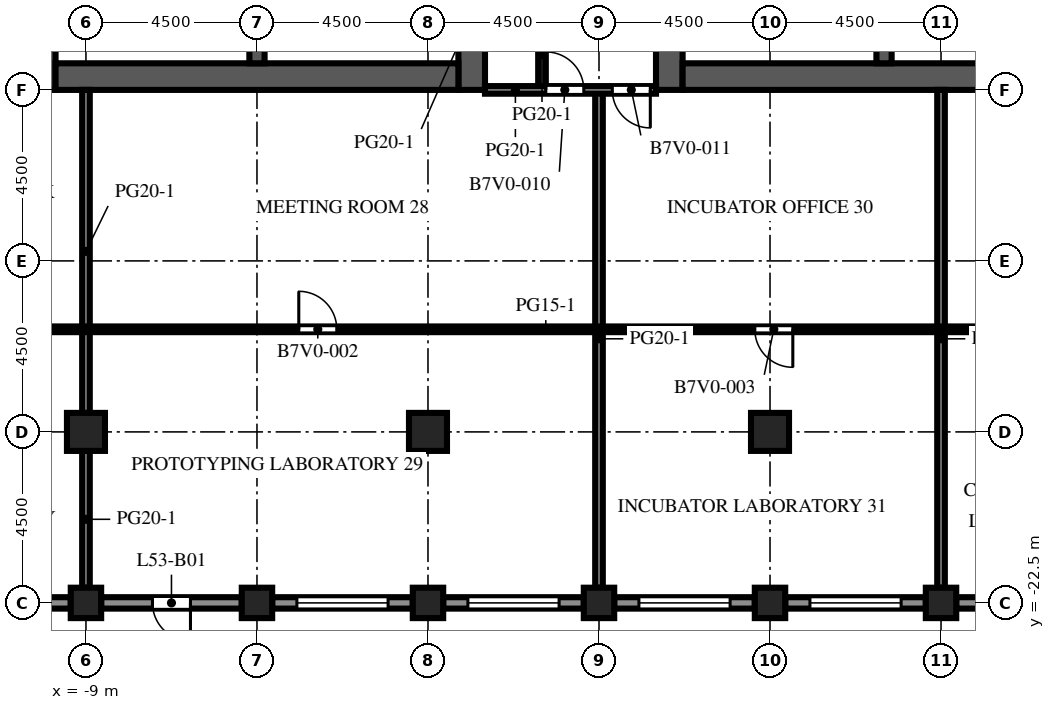
"""IFC4 building model, lengths in metres.
Left out: names, types, materials, properties, quantities, classifications, styles, units other than length and angle.
Written with IfcOpenShell. Run it as: python <this file> out.ifc"""

import sys

from ifc_helpers import new_model, si_unit, direction, frame, frame_2d, origin, origin_2d, place, context, subcontext, project, spatial, rectangle, extrude, element, fill, save


model = new_model("IFC4")
c1 = context("Model", 3, precision=1e-05, world=origin(), true_north=direction((0.0, 1.0)))
c2 = subcontext(c1, "Body", "Model", "MODEL_VIEW")
j1 = project(units=[si_unit("LENGTHUNIT", "METRE"), si_unit("PLANEANGLEUNIT", "RADIAN")], contexts=[c1])
p1 = place(None, origin())
s1 = spatial("IfcSite", under=j1, at=p1, CompositionType="ELEMENT")
p2 = place(p1, origin())
s2 = spatial("IfcBuilding", under=s1, at=p2, CompositionType="ELEMENT")
p3 = place(p2, frame((0.0, 0.0, 235.7)))
s3 = spatial("IfcBuildingStorey", under=s2, at=p3, CompositionType="ELEMENT", Elevation=235.7)
for number, where, z_axis, x_axis in (
    (1, (-9.0, -22.5, 0.0), (0.0, 0.0, 1.0), (1.0, 0.0, 0.0)),
    (2, (-4.5, -22.5, 0.0), (0.0, 0.0, 1.0), (1.0, 0.0, 0.0)),
    (3, (0.0, -22.5, 0.0), (0.0, 0.0, 1.0), (1.0, 0.0, 0.0)),
    (4, (4.5, -22.5, 0.0), (0.0, 0.0, 1.0), (1.0, 0.0, 0.0)),
    (5, (9.0, -22.5, 0.0), (0.0, 0.0, 1.0), (1.0, 0.0, 0.0)),
    (6, (13.5, -22.5, 0.0), (0.0, 0.0, 1.0), (1.0, 0.0, 0.0)),
):
    element("IfcColumn", number, at=place(p3, frame(where, z_axis=z_axis, x_axis=x_axis)), inside=s3, PredefinedType="COLUMN", context=c2, shape_type="SweptSolid", body=[
        extrude(rectangle(XDim=0.8, YDim=0.8, at=origin_2d()), origin(), (0.0, 0.0, 1.0), 4.1),
    ])
for number, where, z_axis, x_axis in (
    (7, (-9.0, -18.0, 0.0), (0.0, 0.0, 1.0), (1.0, 0.0, 0.0)),
    (8, (0.0, -18.0, 0.0), (0.0, 0.0, 1.0), (1.0, 0.0, 0.0)),
    (9, (9.0, -18.0, 0.0), (0.0, 0.0, 1.0), (1.0, 0.0, 0.0)),
):
    element("IfcColumn", number, at=place(p3, frame(where, z_axis=z_axis, x_axis=x_axis)), inside=s3, PredefinedType="COLUMN", context=c2, shape_type="SweptSolid", body=[
        extrude(rectangle(XDim=1.0, YDim=1.0, at=origin_2d()), origin(), (0.0, 0.0, 1.0), 4.1),
    ])
p4 = place(p3, frame((-10.15, -9.0, 0.0), z_axis=(0.0, 0.0, 1.0), x_axis=(0.0, 1.0, 0.0)))
e10 = element("IfcWall", 10, at=p4, inside=s3, PredefinedType="SHEAR", context=c2, shape_type="SweptSolid", body=[
    extrude(rectangle(XDim=27.5, YDim=0.7, at=frame_2d((13.75, 0.0))), origin(), (0.0, 0.0, 1.0), 4.1),
])
p5 = place(p4, frame((12.55, 0.0, 0.0)))
e11 = element("IfcOpeningElement", 11, at=p5, cuts=e10, PredefinedType="OPENING", context=c2, shape_type="SweptSolid", body=[
    extrude(rectangle(XDim=2.4, YDim=2.4, at=frame_2d((1.2, 1.2))), frame((0.0, 0.36, 0.0), z_axis=(0.0, -1.0, 0.0), x_axis=(1.0, 0.0, 0.0)), (0.0, 0.0, 1.0), 0.72),
])
p6 = place(p4, frame((6.825, 0.0, 0.0)))
e12 = element("IfcOpeningElement", 12, at=p6, cuts=e10, PredefinedType="OPENING", context=c2, shape_type="SweptSolid", body=[
    extrude(rectangle(XDim=1.2, YDim=2.1, at=frame_2d((0.6, 1.05))), frame((0.0, 0.36, 0.0), z_axis=(0.0, -1.0, 0.0), x_axis=(1.0, 0.0, 0.0)), (0.0, 0.0, 1.0), 0.72),
])
p7 = place(p4, frame((19.475, 0.0, 0.0)))
e13 = element("IfcOpeningElement", 13, at=p7, cuts=e10, PredefinedType="OPENING", context=c2, shape_type="SweptSolid", body=[
    extrude(rectangle(XDim=1.2, YDim=2.1, at=frame_2d((0.6, 1.05))), frame((0.0, 0.36, 0.0), z_axis=(0.0, -1.0, 0.0), x_axis=(1.0, 0.0, 0.0)), (0.0, 0.0, 1.0), 0.72),
])
p8 = place(p3, frame((1.15, -9.0, 0.0), z_axis=(0.0, 0.0, 1.0), x_axis=(0.0, 1.0, 0.0)))
e14 = element("IfcWall", 14, at=p8, inside=s3, PredefinedType="SHEAR", context=c2, shape_type="SweptSolid", body=[
    extrude(rectangle(XDim=27.5, YDim=0.7, at=frame_2d((13.75, 0.0))), origin(), (0.0, 0.0, 1.0), 4.1),
])
p9 = place(p8, frame((12.55, 0.0, 0.0)))
e15 = element("IfcOpeningElement", 15, at=p9, cuts=e14, PredefinedType="OPENING", context=c2, shape_type="SweptSolid", body=[
    extrude(rectangle(XDim=2.4, YDim=2.4, at=frame_2d((1.2, 1.2))), frame((0.0, 0.36, 0.0), z_axis=(0.0, -1.0, 0.0), x_axis=(1.0, 0.0, 0.0)), (0.0, 0.0, 1.0), 0.72),
])
p10 = place(p8, frame((5.42, 0.0, 0.0)))
e16 = element("IfcOpeningElement", 16, at=p10, cuts=e14, PredefinedType="OPENING", context=c2, shape_type="SweptSolid", body=[
    extrude(rectangle(XDim=1.2, YDim=2.1, at=frame_2d((0.6, 1.05))), frame((0.0, 0.36, 0.0), z_axis=(0.0, -1.0, 0.0), x_axis=(1.0, 0.0, 0.0)), (0.0, 0.0, 1.0), 0.72),
])
p11 = place(p8, frame((19.46, 0.0, 0.0)))
e17 = element("IfcOpeningElement", 17, at=p11, cuts=e14, PredefinedType="OPENING", context=c2, shape_type="SweptSolid", body=[
    extrude(rectangle(XDim=1.0, YDim=2.1, at=frame_2d((0.5, 1.05))), frame((0.0, 0.36, 0.0), z_axis=(0.0, -1.0, 0.0), x_axis=(1.0, 0.0, 0.0)), (0.0, 0.0, 1.0), 0.72),
])
p12 = place(p8, frame((21.17, 0.0, 0.0)))
e18 = element("IfcOpeningElement", 18, at=p12, cuts=e14, PredefinedType="OPENING", context=c2, shape_type="SweptSolid", body=[
    extrude(rectangle(XDim=1.0, YDim=2.1, at=frame_2d((0.5, 1.05))), frame((0.0, 0.36, 0.0), z_axis=(0.0, -1.0, 0.0), x_axis=(1.0, 0.0, 0.0)), (0.0, 0.0, 1.0), 0.72),
])
p13 = place(p8, frame((23.26, 0.0, 0.0)))
e19 = element("IfcOpeningElement", 19, at=p13, cuts=e14, PredefinedType="OPENING", context=c2, shape_type="SweptSolid", body=[
    extrude(rectangle(XDim=1.0, YDim=2.1, at=frame_2d((0.5, 1.05))), frame((0.0, 0.36, 0.0), z_axis=(0.0, -1.0, 0.0), x_axis=(1.0, 0.0, 0.0)), (0.0, 0.0, 1.0), 0.72),
])
p14 = place(p8, frame((25.35, 0.0, 0.0)))
e20 = element("IfcOpeningElement", 20, at=p14, cuts=e14, PredefinedType="OPENING", context=c2, shape_type="SweptSolid", body=[
    extrude(rectangle(XDim=1.0, YDim=2.1, at=frame_2d((0.5, 1.05))), frame((0.0, 0.36, 0.0), z_axis=(0.0, -1.0, 0.0), x_axis=(1.0, 0.0, 0.0)), (0.0, 0.0, 1.0), 0.72),
])
p15 = place(p3, frame((-9.8, -8.65, 0.0), z_axis=(0.0, 0.0, 1.0), x_axis=(1.0, 0.0, 0.0)))
e21 = element("IfcWall", 21, at=p15, inside=s3, PredefinedType="SHEAR", context=c2, shape_type="SweptSolid", body=[
    extrude(rectangle(XDim=10.6, YDim=0.7, at=frame_2d((5.3, 0.0))), origin(), (0.0, 0.0, 1.0), 4.1),
])
p16 = place(p3, frame((-4.5, -8.3, 0.0), z_axis=(0.0, 0.0, 1.0), x_axis=(0.0, 1.0, 0.0)))
e22 = element("IfcWall", 22, at=p16, inside=s3, PredefinedType="SHEAR", context=c2, shape_type="SweptSolid", body=[
    extrude(rectangle(XDim=7.6, YDim=0.4, at=frame_2d((3.8, 0.0))), origin(), (0.0, 0.0, 1.0), 4.1),
])
p17 = place(p3, frame((6.35, -9.0, 0.0), z_axis=(0.0, 0.0, 1.0), x_axis=(0.0, 1.0, 0.0)))
e23 = element("IfcWall", 23, at=p17, inside=s3, PredefinedType="SHEAR", context=c2, shape_type="SweptSolid", body=[
    extrude(rectangle(XDim=27.5, YDim=0.7, at=frame_2d((13.75, 0.0))), origin(), (0.0, 0.0, 1.0), 4.1),
])
p18 = place(p17, frame((12.55, 0.0, 0.0)))
e24 = element("IfcOpeningElement", 24, at=p18, cuts=e23, PredefinedType="OPENING", context=c2, shape_type="SweptSolid", body=[
    extrude(rectangle(XDim=2.4, YDim=2.4, at=frame_2d((1.2, 1.2))), frame((0.0, 0.36, 0.0), z_axis=(0.0, -1.0, 0.0), x_axis=(1.0, 0.0, 0.0)), (0.0, 0.0, 1.0), 0.72),
])
p19 = place(p17, frame((5.42, 0.0, 0.0)))
e25 = element("IfcOpeningElement", 25, at=p19, cuts=e23, PredefinedType="OPENING", context=c2, shape_type="SweptSolid", body=[
    extrude(rectangle(XDim=1.2, YDim=2.1, at=frame_2d((0.6, 1.05))), frame((0.0, 0.36, 0.0), z_axis=(0.0, -1.0, 0.0), x_axis=(1.0, 0.0, 0.0)), (0.0, 0.0, 1.0), 0.72),
])
p20 = place(p17, frame((19.46, 0.0, 0.0)))
e26 = element("IfcOpeningElement", 26, at=p20, cuts=e23, PredefinedType="OPENING", context=c2, shape_type="SweptSolid", body=[
    extrude(rectangle(XDim=1.0, YDim=2.1, at=frame_2d((0.5, 1.05))), frame((0.0, 0.36, 0.0), z_axis=(0.0, -1.0, 0.0), x_axis=(1.0, 0.0, 0.0)), (0.0, 0.0, 1.0), 0.72),
])
p21 = place(p17, frame((21.17, 0.0, 0.0)))
e27 = element("IfcOpeningElement", 27, at=p21, cuts=e23, PredefinedType="OPENING", context=c2, shape_type="SweptSolid", body=[
    extrude(rectangle(XDim=1.0, YDim=2.1, at=frame_2d((0.5, 1.05))), frame((0.0, 0.36, 0.0), z_axis=(0.0, -1.0, 0.0), x_axis=(1.0, 0.0, 0.0)), (0.0, 0.0, 1.0), 0.72),
])
p22 = place(p17, frame((23.26, 0.0, 0.0)))
e28 = element("IfcOpeningElement", 28, at=p22, cuts=e23, PredefinedType="OPENING", context=c2, shape_type="SweptSolid", body=[
    extrude(rectangle(XDim=1.0, YDim=2.1, at=frame_2d((0.5, 1.05))), frame((0.0, 0.36, 0.0), z_axis=(0.0, -1.0, 0.0), x_axis=(1.0, 0.0, 0.0)), (0.0, 0.0, 1.0), 0.72),
])
p23 = place(p17, frame((25.35, 0.0, 0.0)))
e29 = element("IfcOpeningElement", 29, at=p23, cuts=e23, PredefinedType="OPENING", context=c2, shape_type="SweptSolid", body=[
    extrude(rectangle(XDim=1.0, YDim=2.1, at=frame_2d((0.5, 1.05))), frame((0.0, 0.36, 0.0), z_axis=(0.0, -1.0, 0.0), x_axis=(1.0, 0.0, 0.0)), (0.0, 0.0, 1.0), 0.72),
])
p24 = place(p3, frame((6.7, -8.65, 0.0), z_axis=(0.0, 0.0, 1.0), x_axis=(1.0, 0.0, 0.0)))
e30 = element("IfcWall", 30, at=p24, inside=s3, PredefinedType="SHEAR", context=c2, shape_type="SweptSolid", body=[
    extrude(rectangle(XDim=10.6, YDim=0.7, at=frame_2d((5.3, 0.0))), origin(), (0.0, 0.0, 1.0), 4.1),
])
p25 = place(p3, frame((12.0, -8.3, 0.0), z_axis=(0.0, 0.0, 1.0), x_axis=(0.0, 1.0, 0.0)))
e31 = element("IfcWall", 31, at=p25, inside=s3, PredefinedType="SHEAR", context=c2, shape_type="SweptSolid", body=[
    extrude(rectangle(XDim=7.6, YDim=0.4, at=frame_2d((3.8, 0.0))), origin(), (0.0, 0.0, 1.0), 4.1),
])
p26 = place(p3, frame((-9.4, -22.5, 0.0), z_axis=(0.0, 0.0, 1.0), x_axis=(-1.0, 0.0, 0.0)))
e32 = element("IfcWall", 32, at=p26, inside=s3, PredefinedType="SOLIDWALL", context=c2, shape_type="SweptSolid", body=[
    extrude(rectangle(XDim=3.7, YDim=0.3, at=frame_2d((1.85, 0.0))), origin(), (0.0, 0.0, 1.0), 2.85),
])
p27 = place(p26, frame((0.65, 0.0, 0.8)))
e33 = element("IfcOpeningElement", 33, at=p27, cuts=e32, PredefinedType="OPENING", context=c2, shape_type="SweptSolid", body=[
    extrude(rectangle(XDim=2.4, YDim=1.7, at=frame_2d((1.2, 0.85))), frame((0.0, 0.16, 0.0), z_axis=(0.0, -1.0, 0.0), x_axis=(1.0, 0.0, 0.0)), (0.0, 0.0, 1.0), 0.32),
])
p28 = place(p3, frame((-4.9, -22.5, 0.0), z_axis=(0.0, 0.0, 1.0), x_axis=(-1.0, 0.0, 0.0)))
e34 = element("IfcWall", 34, at=p28, inside=s3, PredefinedType="SOLIDWALL", context=c2, shape_type="SweptSolid", body=[
    extrude(rectangle(XDim=3.7, YDim=0.3, at=frame_2d((1.85, 0.0))), origin(), (0.0, 0.0, 1.0), 2.85),
])
p29 = place(p28, frame((1.35, 0.0, 0.0)))
e35 = element("IfcOpeningElement", 35, at=p29, cuts=e34, PredefinedType="OPENING", context=c2, shape_type="SweptSolid", body=[
    extrude(rectangle(XDim=1.0, YDim=2.2, at=frame_2d((0.5, 1.1))), frame((0.0, 0.16, 0.0), z_axis=(0.0, -1.0, 0.0), x_axis=(1.0, 0.0, 0.0)), (0.0, 0.0, 1.0), 0.32),
])
p30 = place(p3, frame((-0.4, -22.5, 0.0), z_axis=(0.0, 0.0, 1.0), x_axis=(-1.0, 0.0, 0.0)))
e36 = element("IfcWall", 36, at=p30, inside=s3, PredefinedType="SOLIDWALL", context=c2, shape_type="SweptSolid", body=[
    extrude(rectangle(XDim=3.7, YDim=0.3, at=frame_2d((1.85, 0.0))), origin(), (0.0, 0.0, 1.0), 2.85),
])
p31 = place(p30, frame((0.65, 0.0, 0.8)))
e37 = element("IfcOpeningElement", 37, at=p31, cuts=e36, PredefinedType="OPENING", context=c2, shape_type="SweptSolid", body=[
    extrude(rectangle(XDim=2.4, YDim=1.7, at=frame_2d((1.2, 0.85))), frame((0.0, 0.16, 0.0), z_axis=(0.0, -1.0, 0.0), x_axis=(1.0, 0.0, 0.0)), (0.0, 0.0, 1.0), 0.32),
])
p32 = place(p3, frame((4.1, -22.5, 0.0), z_axis=(0.0, 0.0, 1.0), x_axis=(-1.0, 0.0, 0.0)))
e38 = element("IfcWall", 38, at=p32, inside=s3, PredefinedType="SOLIDWALL", context=c2, shape_type="SweptSolid", body=[
    extrude(rectangle(XDim=3.7, YDim=0.3, at=frame_2d((1.85, 0.0))), origin(), (0.0, 0.0, 1.0), 2.85),
])
p33 = place(p32, frame((0.65, 0.0, 0.8)))
e39 = element("IfcOpeningElement", 39, at=p33, cuts=e38, PredefinedType="OPENING", context=c2, shape_type="SweptSolid", body=[
    extrude(rectangle(XDim=2.4, YDim=1.7, at=frame_2d((1.2, 0.85))), frame((0.0, 0.16, 0.0), z_axis=(0.0, -1.0, 0.0), x_axis=(1.0, 0.0, 0.0)), (0.0, 0.0, 1.0), 0.32),
])
p34 = place(p3, frame((8.6, -22.5, 0.0), z_axis=(0.0, 0.0, 1.0), x_axis=(-1.0, 0.0, 0.0)))
e40 = element("IfcWall", 40, at=p34, inside=s3, PredefinedType="SOLIDWALL", context=c2, shape_type="SweptSolid", body=[
    extrude(rectangle(XDim=3.7, YDim=0.3, at=frame_2d((1.85, 0.0))), origin(), (0.0, 0.0, 1.0), 2.85),
])
p35 = place(p34, frame((0.65, 0.0, 0.8)))
e41 = element("IfcOpeningElement", 41, at=p35, cuts=e40, PredefinedType="OPENING", context=c2, shape_type="SweptSolid", body=[
    extrude(rectangle(XDim=2.4, YDim=1.7, at=frame_2d((1.2, 0.85))), frame((0.0, 0.16, 0.0), z_axis=(0.0, -1.0, 0.0), x_axis=(1.0, 0.0, 0.0)), (0.0, 0.0, 1.0), 0.32),
])
p36 = place(p3, frame((13.1, -22.5, 0.0), z_axis=(0.0, 0.0, 1.0), x_axis=(-1.0, 0.0, 0.0)))
e42 = element("IfcWall", 42, at=p36, inside=s3, PredefinedType="SOLIDWALL", context=c2, shape_type="SweptSolid", body=[
    extrude(rectangle(XDim=3.7, YDim=0.3, at=frame_2d((1.85, 0.0))), origin(), (0.0, 0.0, 1.0), 2.85),
])
p37 = place(p36, frame((0.65, 0.0, 0.8)))
e43 = element("IfcOpeningElement", 43, at=p37, cuts=e42, PredefinedType="OPENING", context=c2, shape_type="SweptSolid", body=[
    extrude(rectangle(XDim=2.4, YDim=1.7, at=frame_2d((1.2, 0.85))), frame((0.0, 0.16, 0.0), z_axis=(0.0, -1.0, 0.0), x_axis=(1.0, 0.0, 0.0)), (0.0, 0.0, 1.0), 0.32),
])
p38 = place(p3, frame((17.6, -22.5, 0.0), z_axis=(0.0, 0.0, 1.0), x_axis=(-1.0, 0.0, 0.0)))
e44 = element("IfcWall", 44, at=p38, inside=s3, PredefinedType="SOLIDWALL", context=c2, shape_type="SweptSolid", body=[
    extrude(rectangle(XDim=3.7, YDim=0.3, at=frame_2d((1.85, 0.0))), origin(), (0.0, 0.0, 1.0), 2.85),
])
p39 = place(p38, frame((1.35, 0.0, 0.0)))
e45 = element("IfcOpeningElement", 45, at=p39, cuts=e44, PredefinedType="OPENING", context=c2, shape_type="SweptSolid", body=[
    extrude(rectangle(XDim=1.0, YDim=2.2, at=frame_2d((0.5, 1.1))), frame((0.0, 0.16, 0.0), z_axis=(0.0, -1.0, 0.0), x_axis=(1.0, 0.0, 0.0)), (0.0, 0.0, 1.0), 0.32),
])
p40 = place(p3, frame((-9.0, -22.1, 0.0), z_axis=(0.0, 0.0, 1.0), x_axis=(0.0, 1.0, 0.0)))
e46 = element("IfcWall", 46, at=p40, inside=s3, PredefinedType="PARTITIONING", context=c2, shape_type="SweptSolid", body=[
    extrude(rectangle(XDim=3.6, YDim=0.2, at=frame_2d((1.8, 0.0))), origin(), (0.0, 0.0, 1.0), 3.65),
])
p41 = place(p3, frame((-9.0, -17.5, 0.0), z_axis=(0.0, 0.0, 1.0), x_axis=(0.0, 1.0, 0.0)))
e47 = element("IfcWall", 47, at=p41, inside=s3, PredefinedType="PARTITIONING", context=c2, shape_type="SweptSolid", body=[
    extrude(rectangle(XDim=8.5, YDim=0.2, at=frame_2d((4.25, 0.0))), origin(), (0.0, 0.0, 1.0), 3.65),
])
p42 = place(p3, frame((3.0, -9.0, 0.0), z_axis=(0.0, 0.0, 1.0), x_axis=(0.0, 1.0, 0.0)))
e48 = element("IfcWall", 48, at=p42, inside=s3, PredefinedType="PARTITIONING", context=c2, shape_type="SweptSolid", body=[
    extrude(rectangle(XDim=4.5, YDim=0.2, at=frame_2d((2.25, 0.0))), origin(), (0.0, 0.0, 1.0), 3.65),
])
p43 = place(p42, frame((1.85, 0.0, 0.0)))
e49 = element("IfcOpeningElement", 49, at=p43, cuts=e48, PredefinedType="OPENING", context=c2, shape_type="SweptSolid", body=[
    extrude(rectangle(XDim=1.0, YDim=2.1, at=frame_2d((0.5, 1.05))), frame((0.0, 0.11, 0.0), z_axis=(0.0, -1.0, 0.0), x_axis=(1.0, 0.0, 0.0)), (0.0, 0.0, 1.0), 0.22),
])
for number, where, z_axis, x_axis in (
    (50, (4.5, -22.1, 0.0), (0.0, 0.0, 1.0), (0.0, 1.0, 0.0)),
    (51, (13.5, -22.1, 0.0), (0.0, 0.0, 1.0), (0.0, 1.0, 0.0)),
):
    element("IfcWall", number, at=place(p3, frame(where, z_axis=z_axis, x_axis=x_axis)), inside=s3, PredefinedType="PARTITIONING", context=c2, shape_type="SweptSolid", body=[
        extrude(rectangle(XDim=13.1, YDim=0.2, at=frame_2d((6.55, 0.0))), origin(), (0.0, 0.0, 1.0), 3.65),
    ])
p44 = place(p3, frame((21.0, -15.3, 0.0), z_axis=(0.0, 0.0, 1.0), x_axis=(-1.0, 0.0, 0.0)))
e52 = element("IfcWall", 52, at=p44, inside=s3, PredefinedType="PARTITIONING", context=c2, shape_type="SweptSolid", body=[
    extrude(rectangle(XDim=34.5, YDim=0.15, at=frame_2d((17.25, 0.0))), origin(), (0.0, 0.0, 1.0), 3.65),
])
p45 = place(p44, frame((32.4, 0.0, 0.0)))
e53 = element("IfcOpeningElement", 53, at=p45, cuts=e52, PredefinedType="OPENING", context=c2, shape_type="SweptSolid", body=[
    extrude(rectangle(XDim=1.0, YDim=2.1, at=frame_2d((0.5, 1.05))), frame((0.0, 0.085, 0.0), z_axis=(0.0, -1.0, 0.0), x_axis=(1.0, 0.0, 0.0)), (0.0, 0.0, 1.0), 0.17),
])
p46 = place(p44, frame((23.4, 0.0, 0.0)))
e54 = element("IfcOpeningElement", 54, at=p46, cuts=e52, PredefinedType="OPENING", context=c2, shape_type="SweptSolid", body=[
    extrude(rectangle(XDim=1.0, YDim=2.1, at=frame_2d((0.5, 1.05))), frame((0.0, 0.085, 0.0), z_axis=(0.0, -1.0, 0.0), x_axis=(1.0, 0.0, 0.0)), (0.0, 0.0, 1.0), 0.17),
])
p47 = place(p44, frame((11.4, 0.0, 0.0)))
e55 = element("IfcOpeningElement", 55, at=p47, cuts=e52, PredefinedType="OPENING", context=c2, shape_type="SweptSolid", body=[
    extrude(rectangle(XDim=1.0, YDim=2.1, at=frame_2d((0.5, 1.05))), frame((0.0, 0.085, 0.0), z_axis=(0.0, -1.0, 0.0), x_axis=(1.0, 0.0, 0.0)), (0.0, 0.0, 1.0), 0.17),
])
p48 = place(p44, frame((2.4, 0.0, 0.0)))
e56 = element("IfcOpeningElement", 56, at=p48, cuts=e52, PredefinedType="OPENING", context=c2, shape_type="SweptSolid", body=[
    extrude(rectangle(XDim=1.0, YDim=2.1, at=frame_2d((0.5, 1.05))), frame((0.0, 0.085, 0.0), z_axis=(0.0, -1.0, 0.0), x_axis=(1.0, 0.0, 0.0)), (0.0, 0.0, 1.0), 0.17),
])
p49 = place(p3, frame((6.0, -9.0, 0.0), z_axis=(0.0, 0.0, 1.0), x_axis=(-1.0, 0.0, 0.0)))
e57 = element("IfcWall", 57, at=p49, inside=s3, PredefinedType="PARTITIONING", context=c2, shape_type="SweptSolid", body=[
    extrude(rectangle(XDim=4.5, YDim=0.2, at=frame_2d((2.25, 0.0))), origin(), (0.0, 0.0, 1.0), 3.65),
])
p50 = place(p49, frame((1.9, 0.0, 0.0)))
e58 = element("IfcOpeningElement", 58, at=p50, cuts=e57, PredefinedType="OPENING", context=c2, shape_type="SweptSolid", body=[
    extrude(rectangle(XDim=1.0, YDim=2.1, at=frame_2d((0.5, 1.05))), frame((0.0, 0.11, 0.0), z_axis=(0.0, -1.0, 0.0), x_axis=(1.0, 0.0, 0.0)), (0.0, 0.0, 1.0), 0.22),
])
p51 = place(p49, frame((0.15, 0.0, 0.0)))
e59 = element("IfcOpeningElement", 59, at=p51, cuts=e57, PredefinedType="OPENING", context=c2, shape_type="SweptSolid", body=[
    extrude(rectangle(XDim=1.0, YDim=2.1, at=frame_2d((0.5, 1.05))), frame((0.0, 0.11, 0.0), z_axis=(0.0, -1.0, 0.0), x_axis=(1.0, 0.0, 0.0)), (0.0, 0.0, 1.0), 0.22),
])
p52 = place(p29, origin())
e60 = element("IfcDoor", 60, at=p52, inside=s3, OperationType="SINGLE_SWING_LEFT", PredefinedType="DOOR", context=c2, shape_type="SweptSolid", body=[
    extrude(rectangle(XDim=1.0, YDim=2.2, at=frame_2d((0.5, 1.1))), frame((0.0, 0.025, 0.0), z_axis=(0.0, -1.0, 0.0), x_axis=(1.0, 0.0, 0.0)), (0.0, 0.0, 1.0), 0.05),
])
fill(e35, e60)
p53 = place(p31, origin())
e61 = element("IfcWindow", 61, at=p53, inside=s3, PartitioningType="SINGLE_PANEL", PredefinedType="WINDOW", context=c2, shape_type="SweptSolid", body=[
    extrude(rectangle(XDim=2.4, YDim=1.7, at=frame_2d((1.2, 0.85))), frame((0.0, 0.03, 0.0), z_axis=(0.0, -1.0, 0.0), x_axis=(1.0, 0.0, 0.0)), (0.0, 0.0, 1.0), 0.06),
])
fill(e37, e61)
p54 = place(p33, origin())
e62 = element("IfcWindow", 62, at=p54, inside=s3, PartitioningType="SINGLE_PANEL", PredefinedType="WINDOW", context=c2, shape_type="SweptSolid", body=[
    extrude(rectangle(XDim=2.4, YDim=1.7, at=frame_2d((1.2, 0.85))), frame((0.0, 0.03, 0.0), z_axis=(0.0, -1.0, 0.0), x_axis=(1.0, 0.0, 0.0)), (0.0, 0.0, 1.0), 0.06),
])
fill(e39, e62)
p55 = place(p35, origin())
e63 = element("IfcWindow", 63, at=p55, inside=s3, PartitioningType="SINGLE_PANEL", PredefinedType="WINDOW", context=c2, shape_type="SweptSolid", body=[
    extrude(rectangle(XDim=2.4, YDim=1.7, at=frame_2d((1.2, 0.85))), frame((0.0, 0.03, 0.0), z_axis=(0.0, -1.0, 0.0), x_axis=(1.0, 0.0, 0.0)), (0.0, 0.0, 1.0), 0.06),
])
fill(e41, e63)
p56 = place(p37, origin())
e64 = element("IfcWindow", 64, at=p56, inside=s3, PartitioningType="SINGLE_PANEL", PredefinedType="WINDOW", context=c2, shape_type="SweptSolid", body=[
    extrude(rectangle(XDim=2.4, YDim=1.7, at=frame_2d((1.2, 0.85))), frame((0.0, 0.03, 0.0), z_axis=(0.0, -1.0, 0.0), x_axis=(1.0, 0.0, 0.0)), (0.0, 0.0, 1.0), 0.06),
])
fill(e43, e64)
p57 = place(p46, origin())
e65 = element("IfcDoor", 65, at=p57, inside=s3, OperationType="SINGLE_SWING_RIGHT", PredefinedType="DOOR", context=c2, shape_type="SweptSolid", body=[
    extrude(rectangle(XDim=1.0, YDim=2.1, at=frame_2d((0.5, 1.05))), frame((0.0, 0.025, 0.0), z_axis=(0.0, -1.0, 0.0), x_axis=(1.0, 0.0, 0.0)), (0.0, 0.0, 1.0), 0.05),
])
fill(e54, e65)
p58 = place(p47, origin())
e66 = element("IfcDoor", 66, at=p58, inside=s3, OperationType="SINGLE_SWING_LEFT", PredefinedType="DOOR", context=c2, shape_type="SweptSolid", body=[
    extrude(rectangle(XDim=1.0, YDim=2.1, at=frame_2d((0.5, 1.05))), frame((0.0, 0.025, 0.0), z_axis=(0.0, -1.0, 0.0), x_axis=(1.0, 0.0, 0.0)), (0.0, 0.0, 1.0), 0.05),
])
fill(e55, e66)
p59 = place(p50, origin())
e67 = element("IfcDoor", 67, at=p59, inside=s3, OperationType="SINGLE_SWING_RIGHT", PredefinedType="DOOR", context=c2, shape_type="SweptSolid", body=[
    extrude(rectangle(XDim=1.0, YDim=2.1, at=frame_2d((0.5, 1.05))), frame((0.0, 0.025, 0.0), z_axis=(0.0, -1.0, 0.0), x_axis=(1.0, 0.0, 0.0)), (0.0, 0.0, 1.0), 0.05),
])
fill(e58, e67)
p60 = place(p51, origin())
e68 = element("IfcDoor", 68, at=p60, inside=s3, OperationType="SINGLE_SWING_LEFT", PredefinedType="DOOR", context=c2, shape_type="SweptSolid", body=[
    extrude(rectangle(XDim=1.0, YDim=2.1, at=frame_2d((0.5, 1.05))), frame((0.0, 0.025, 0.0), z_axis=(0.0, -1.0, 0.0), x_axis=(1.0, 0.0, 0.0)), (0.0, 0.0, 1.0), 0.05),
])
fill(e59, e68)
save(model, sys.argv[1])
